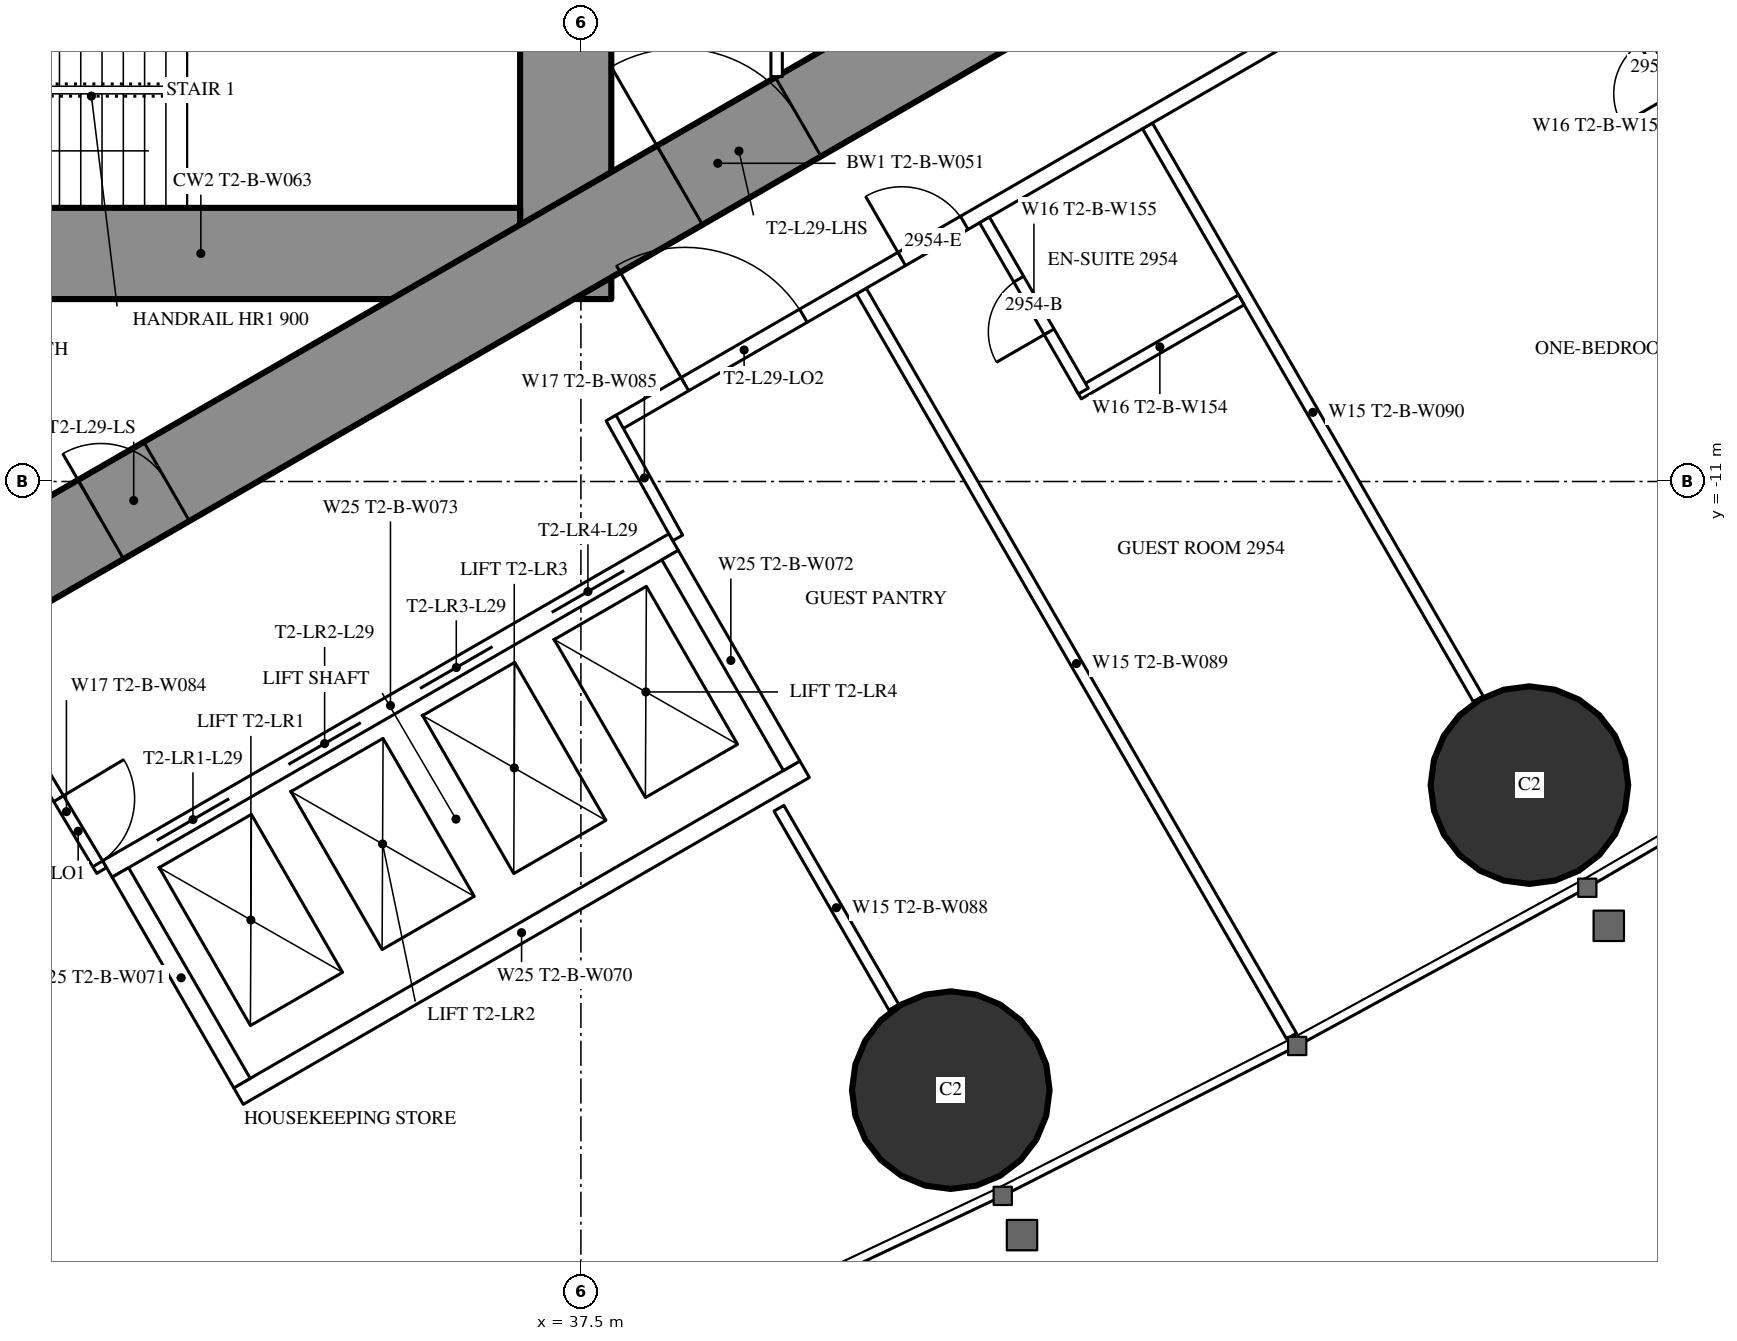
"""IFC4 building model, lengths in metres.
Left out: names, types, materials, properties, quantities, classifications, styles, units other than length and angle.
Written with IfcOpenShell. Run it as: python <this file> out.ifc"""

import sys

from ifc_helpers import new_model, si_unit, direction, frame, frame_2d, origin, origin_2d, place, context, subcontext, project, spatial, rectangle, hollow_circle, extrude, element, fill, save


model = new_model("IFC4")
c1 = context("Model", 3, precision=1e-05, world=origin(), true_north=direction((0.0, 1.0)))
c2 = subcontext(c1, "Body", "Model", "MODEL_VIEW")
j1 = project(units=[si_unit("LENGTHUNIT", "METRE"), si_unit("PLANEANGLEUNIT", "RADIAN")], contexts=[c1])
p1 = place(None, origin())
s1 = spatial("IfcSite", under=j1, at=p1, CompositionType="ELEMENT")
p2 = place(p1, origin())
s2 = spatial("IfcBuilding", under=s1, at=p2, CompositionType="ELEMENT")
p3 = place(p2, frame((0.0, 0.0, 111.6)))
s3 = spatial("IfcBuildingStorey", under=s2, at=p3, CompositionType="ELEMENT", Elevation=111.6)
for number, where, z_axis, x_axis in (
    (1, (42.366, -19.007, 0.0), (0.0, 0.0, 1.0), (1.0, 0.0, 0.0)),
    (2, (49.979, -14.994, 0.0), (0.0, 0.0, 1.0), (1.0, 0.0, 0.0)),
):
    element("IfcColumn", number, at=place(p3, frame(where, z_axis=z_axis, x_axis=x_axis)), inside=s3, PredefinedType="COLUMN", context=c2, shape_type="SweptSolid", body=[
        extrude(hollow_circle(Radius=1.3, WallThickness=0.1, at=origin_2d()), origin(), (0.0, 0.0, 1.0), 3.5),
    ])
p4 = place(p3, frame((37.3, -8.6, 0.0), z_axis=(0.0, 0.0, 1.0), x_axis=(0.0, 1.0, 0.0)))
e3 = element("IfcWall", 3, at=p4, inside=s3, PredefinedType="SHEAR", context=c2, shape_type="SweptSolid", body=[
    extrude(rectangle(XDim=17.2, YDim=1.2, at=frame_2d((8.6, 0.0))), origin(), (0.0, 0.0, 1.0), 3.5),
])
p5 = place(p4, frame((7.7, 0.0, 0.0)))
e4 = element("IfcOpeningElement", 4, at=p5, cuts=e3, PredefinedType="OPENING", context=c2, shape_type="SweptSolid", body=[
    extrude(rectangle(XDim=1.8, YDim=2.2, at=frame_2d((0.9, 1.1))), frame((0.0, 0.61, 0.0), z_axis=(0.0, -1.0, 0.0), x_axis=(1.0, 0.0, 0.0)), (0.0, 0.0, 1.0), 1.22),
])
p6 = place(p3, frame((28.3, -8.0, 0.0), z_axis=(0.0, 0.0, 1.0), x_axis=(1.0, 0.0, 0.0)))
e5 = element("IfcWall", 5, at=p6, inside=s3, PredefinedType="SHEAR", context=c2, shape_type="SweptSolid", body=[
    extrude(rectangle(XDim=8.4, YDim=1.2, at=frame_2d((4.2, 0.0))), origin(), (0.0, 0.0, 1.0), 3.5),
])
p7 = place(p6, frame((0.25, 0.0, 0.0)))
e6 = element("IfcOpeningElement", 6, at=p7, cuts=e5, PredefinedType="OPENING", context=c2, shape_type="SweptSolid", body=[
    extrude(rectangle(XDim=1.0, YDim=2.2, at=frame_2d((0.5, 1.1))), frame((0.0, 0.61, 0.0), z_axis=(0.0, -1.0, 0.0), x_axis=(1.0, 0.0, 0.0)), (0.0, 0.0, 1.0), 1.22),
])
p8 = place(p3, frame((27.2, -13.8, 0.0), z_axis=(0.0, 0.0, 1.0), x_axis=(0.866027159892, 0.499996958321, 0.0)))
e7 = element("IfcWall", 7, at=p8, inside=s3, PredefinedType="SHEAR", context=c2, shape_type="SweptSolid", body=[
    extrude(rectangle(XDim=27.947, YDim=1.2, at=frame_2d((13.973, 0.0))), origin(), (0.0, 0.0, 1.0), 3.5),
])
p9 = place(p8, frame((4.6, 0.0, 0.0)))
e8 = element("IfcOpeningElement", 8, at=p9, cuts=e7, PredefinedType="OPENING", context=c2, shape_type="SweptSolid", body=[
    extrude(rectangle(XDim=1.0, YDim=2.2, at=frame_2d((0.5, 1.1))), frame((0.0, 0.61, 0.0), z_axis=(0.0, -1.0, 0.0), x_axis=(1.0, 0.0, 0.0)), (0.0, 0.0, 1.0), 1.22),
])
p10 = place(p8, frame((13.395, 0.0, 0.0)))
e9 = element("IfcOpeningElement", 9, at=p10, cuts=e7, PredefinedType="OPENING", context=c2, shape_type="SweptSolid", body=[
    extrude(rectangle(XDim=1.8, YDim=2.2, at=frame_2d((0.9, 1.1))), frame((0.0, 0.61, 0.0), z_axis=(0.0, -1.0, 0.0), x_axis=(1.0, 0.0, 0.0)), (0.0, 0.0, 1.0), 1.22),
])
p11 = place(p3, frame((41.19, -8.494, 0.0), z_axis=(0.0, 0.0, 1.0), x_axis=(0.49999258054, -0.866029687369, 0.0)))
e10 = element("IfcWall", 10, at=p11, inside=s3, PredefinedType="PARTITIONING", context=c2, shape_type="SweptSolid", body=[
    extrude(rectangle(XDim=11.318, YDim=0.15, at=frame_2d((5.659, 0.0))), origin(), (0.0, 0.0, 1.0), 3.25),
])
p12 = place(p3, frame((44.954, -6.321, 0.0), z_axis=(0.0, 0.0, 1.0), x_axis=(0.500018676722, -0.866014620505, 0.0)))
e11 = element("IfcWall", 11, at=p12, inside=s3, PredefinedType="PARTITIONING", context=c2, shape_type="SweptSolid", body=[
    extrude(rectangle(XDim=8.704, YDim=0.15, at=frame_2d((4.352, 0.0))), origin(), (0.0, 0.0, 1.0), 2.2),
])
p13 = place(p3, frame((40.105, -15.299, 0.0), z_axis=(0.0, 0.0, 1.0), x_axis=(0.499978822259, -0.866037630414, 0.0)))
e12 = element("IfcWall", 12, at=p13, inside=s3, PredefinedType="PARTITIONING", context=c2, shape_type="SweptSolid", body=[
    extrude(rectangle(XDim=3.023, YDim=0.15, at=frame_2d((1.511, 0.0))), origin(), (0.0, 0.0, 1.0), 3.25),
])
p14 = place(p3, frame((37.96, -10.243, 0.0), z_axis=(0.0, 0.0, 1.0), x_axis=(0.866026429433, 0.499998223521, 0.0)))
e13 = element("IfcWall", 13, at=p14, inside=s3, PredefinedType="PARTITIONING", context=c2, shape_type="SweptSolid", body=[
    extrude(rectangle(XDim=20.487, YDim=0.2, at=frame_2d((10.243, 0.0))), origin(), (0.0, 0.0, 1.0), 3.25),
])
p15 = place(p14, frame((4.343, 0.0, 0.0)))
e14 = element("IfcOpeningElement", 14, at=p15, cuts=e13, PredefinedType="OPENING", context=c2, shape_type="SweptSolid", body=[
    extrude(rectangle(XDim=0.95, YDim=2.2, at=frame_2d((0.475, 1.1))), frame((0.0, 0.11, 0.0), z_axis=(0.0, -1.0, 0.0), x_axis=(1.0, 0.0, 0.0)), (0.0, 0.0, 1.0), 0.22),
])
p16 = place(p14, frame((15.385, 0.0, 0.0)))
e15 = element("IfcOpeningElement", 15, at=p16, cuts=e13, PredefinedType="OPENING", context=c2, shape_type="SweptSolid", body=[
    extrude(rectangle(XDim=0.95, YDim=2.2, at=frame_2d((0.475, 1.1))), frame((0.0, 0.11, 0.0), z_axis=(0.0, -1.0, 0.0), x_axis=(1.0, 0.0, 0.0)), (0.0, 0.0, 1.0), 0.22),
])
p17 = place(p14, frame((17.085, 0.0, 0.0)))
e16 = element("IfcOpeningElement", 16, at=p17, cuts=e13, PredefinedType="OPENING", context=c2, shape_type="SweptSolid", body=[
    extrude(rectangle(XDim=0.95, YDim=2.2, at=frame_2d((0.475, 1.1))), frame((0.0, 0.11, 0.0), z_axis=(0.0, -1.0, 0.0), x_axis=(1.0, 0.0, 0.0)), (0.0, 0.0, 1.0), 0.22),
])
p18 = place(p14, frame((1.048, 0.0, 0.0)))
e17 = element("IfcOpeningElement", 17, at=p18, cuts=e13, PredefinedType="OPENING", context=c2, shape_type="SweptSolid", body=[
    extrude(rectangle(XDim=1.8, YDim=2.2, at=frame_2d((0.9, 1.1))), frame((0.0, 0.11, 0.0), z_axis=(0.0, -1.0, 0.0), x_axis=(1.0, 0.0, 0.0)), (0.0, 0.0, 1.0), 0.22),
])
p19 = place(p3, frame((30.267, -14.569, 0.0), z_axis=(0.0, 0.0, 1.0), x_axis=(0.514336634837, -0.857588377991, 0.0)))
e18 = element("IfcWall", 18, at=p19, inside=s3, PredefinedType="PARTITIONING", context=c2, shape_type="SweptSolid", body=[
    extrude(rectangle(XDim=1.805, YDim=0.15, at=frame_2d((0.903, 0.0))), origin(), (0.0, 0.0, 1.0), 3.25),
])
p20 = place(p19, frame((0.703, 0.0, 0.0)))
e19 = element("IfcOpeningElement", 19, at=p20, cuts=e18, PredefinedType="OPENING", context=c2, shape_type="SweptSolid", body=[
    extrude(rectangle(XDim=1.0, YDim=2.2, at=frame_2d((0.5, 1.1))), frame((0.0, 0.085, 0.0), z_axis=(0.0, -1.0, 0.0), x_axis=(1.0, 0.0, 0.0)), (0.0, 0.0, 1.0), 0.17),
])
p21 = place(p3, frame((38.773, -11.742, 0.0), z_axis=(0.0, 0.0, 1.0), x_axis=(-0.485528096672, 0.8742210632, 0.0)))
e20 = element("IfcWall", 20, at=p21, inside=s3, PredefinedType="PARTITIONING", context=c2, shape_type="SweptSolid", body=[
    extrude(rectangle(XDim=1.805, YDim=0.15, at=frame_2d((0.903, 0.0))), origin(), (0.0, 0.0, 1.0), 3.25),
])
p22 = place(p3, frame((44.045, -9.848, 0.0), z_axis=(0.0, 0.0, 1.0), x_axis=(0.866031185235, 0.4999899861, 0.0)))
e21 = element("IfcWall", 21, at=p22, inside=s3, PredefinedType="PARTITIONING", context=c2, shape_type="SweptSolid", body=[
    extrude(rectangle(XDim=2.475, YDim=0.15, at=frame_2d((1.238, 0.0))), origin(), (0.0, 0.0, 1.0), 3.25),
])
p23 = place(p3, frame((42.81, -7.559, 0.0), z_axis=(0.0, 0.0, 1.0), x_axis=(0.499936506574, -0.866062058628, 0.0)))
e22 = element("IfcWall", 22, at=p23, inside=s3, PredefinedType="PARTITIONING", context=c2, shape_type="SweptSolid", body=[
    extrude(rectangle(XDim=2.6, YDim=0.15, at=frame_2d((1.3, 0.0))), origin(), (0.0, 0.0, 1.0), 3.25),
])
p24 = place(p23, frame((0.9, 0.0, 0.0)))
e23 = element("IfcOpeningElement", 23, at=p24, cuts=e22, PredefinedType="OPENING", context=c2, shape_type="SweptSolid", body=[
    extrude(rectangle(XDim=0.8, YDim=2.2, at=frame_2d((0.4, 1.1))), frame((0.0, 0.085, 0.0), z_axis=(0.0, -1.0, 0.0), x_axis=(1.0, 0.0, 0.0)), (0.0, 0.0, 1.0), 0.17),
])
p25 = place(p3, frame((51.038, -4.425, 0.0), z_axis=(0.0, 0.0, 1.0), x_axis=(0.49997716683, -0.86603858612, 0.0)))
e24 = element("IfcWall", 24, at=p25, inside=s3, PredefinedType="PARTITIONING", context=c2, shape_type="SweptSolid", body=[
    extrude(rectangle(XDim=2.6, YDim=0.15, at=frame_2d((1.3, 0.0))), origin(), (0.0, 0.0, 1.0), 3.25),
])
p26 = place(p25, frame((0.9, 0.0, 0.0)))
e25 = element("IfcOpeningElement", 25, at=p26, cuts=e24, PredefinedType="OPENING", context=c2, shape_type="SweptSolid", body=[
    extrude(rectangle(XDim=0.8, YDim=2.2, at=frame_2d((0.4, 1.1))), frame((0.0, 0.085, 0.0), z_axis=(0.0, -1.0, 0.0), x_axis=(1.0, 0.0, 0.0)), (0.0, 0.0, 1.0), 0.17),
])
p27 = place(p3, frame((40.075, -5.674, 0.0), z_axis=(0.0, 0.0, 1.0), x_axis=(0.0, 1.0, 0.0)))
e26 = element("IfcWall", 26, at=p27, inside=s3, PredefinedType="PARTITIONING", context=c2, shape_type="SweptSolid", body=[
    extrude(rectangle(XDim=6.874, YDim=0.15, at=frame_2d((3.437, 0.0))), origin(), (0.0, 0.0, 1.0), 3.25),
])
p28 = place(p27, frame((2.537, 0.0, 0.0)))
e27 = element("IfcOpeningElement", 27, at=p28, cuts=e26, PredefinedType="OPENING", context=c2, shape_type="SweptSolid", body=[
    extrude(rectangle(XDim=1.8, YDim=2.2, at=frame_2d((0.9, 1.1))), frame((0.0, 0.085, 0.0), z_axis=(0.0, -1.0, 0.0), x_axis=(1.0, 0.0, 0.0)), (0.0, 0.0, 1.0), 0.17),
])
p29 = place(p3, frame((31.271, -16.097, 0.0), z_axis=(0.0, 0.0, 1.0), x_axis=(0.86604045752, 0.499973925258, 0.0)))
e28 = element("IfcWall", 28, at=p29, inside=s3, PredefinedType="PARTITIONING", context=c2, shape_type="SweptSolid", body=[
    extrude(rectangle(XDim=8.6, YDim=0.25, at=frame_2d((4.3, 0.0))), origin(), (0.0, 0.0, 1.0), 3.25),
])
p30 = place(p29, frame((0.75, 0.0, 0.0)))
e29 = element("IfcOpeningElement", 29, at=p30, cuts=e28, PredefinedType="OPENING", context=c2, shape_type="SweptSolid", body=[
    extrude(rectangle(XDim=1.1, YDim=2.2, at=frame_2d((0.55, 1.1))), frame((0.0, 0.135, 0.0), z_axis=(0.0, -1.0, 0.0), x_axis=(1.0, 0.0, 0.0)), (0.0, 0.0, 1.0), 0.27),
])
p31 = place(p29, frame((2.75, 0.0, 0.0)))
e30 = element("IfcOpeningElement", 30, at=p31, cuts=e28, PredefinedType="OPENING", context=c2, shape_type="SweptSolid", body=[
    extrude(rectangle(XDim=1.1, YDim=2.2, at=frame_2d((0.55, 1.1))), frame((0.0, 0.135, 0.0), z_axis=(0.0, -1.0, 0.0), x_axis=(1.0, 0.0, 0.0)), (0.0, 0.0, 1.0), 0.27),
])
p32 = place(p29, frame((4.75, 0.0, 0.0)))
e31 = element("IfcOpeningElement", 31, at=p32, cuts=e28, PredefinedType="OPENING", context=c2, shape_type="SweptSolid", body=[
    extrude(rectangle(XDim=1.1, YDim=2.2, at=frame_2d((0.55, 1.1))), frame((0.0, 0.135, 0.0), z_axis=(0.0, -1.0, 0.0), x_axis=(1.0, 0.0, 0.0)), (0.0, 0.0, 1.0), 0.27),
])
p33 = place(p29, frame((6.75, 0.0, 0.0)))
e32 = element("IfcOpeningElement", 32, at=p33, cuts=e28, PredefinedType="OPENING", context=c2, shape_type="SweptSolid", body=[
    extrude(rectangle(XDim=1.1, YDim=2.2, at=frame_2d((0.55, 1.1))), frame((0.0, 0.135, 0.0), z_axis=(0.0, -1.0, 0.0), x_axis=(1.0, 0.0, 0.0)), (0.0, 0.0, 1.0), 0.27),
])
p34 = place(p3, frame((32.996, -19.086, 0.0), z_axis=(0.0, 0.0, 1.0), x_axis=(0.866028165386, 0.499995216735, 0.0)))
e33 = element("IfcWall", 33, at=p34, inside=s3, PredefinedType="PARTITIONING", context=c2, shape_type="SweptSolid", body=[
    extrude(rectangle(XDim=8.6, YDim=0.25, at=frame_2d((4.3, 0.0))), origin(), (0.0, 0.0, 1.0), 3.25),
])
for number, where, z_axis, x_axis in (
    (34, (31.441, -16.143, 0.0), (0.0, 0.0, 1.0), (0.5, -0.866, 0.0)),
    (35, (38.673, -11.968, 0.0), (0.0, 0.0, 1.0), (0.5, -0.866, 0.0)),
):
    element("IfcWall", number, at=place(p3, frame(where, z_axis=z_axis, x_axis=x_axis)), inside=s3, PredefinedType="PARTITIONING", context=c2, shape_type="SweptSolid", body=[
        extrude(rectangle(XDim=3.201, YDim=0.25, at=frame_2d((1.6, 0.0))), origin(), (0.0, 0.0, 1.0), 3.25),
    ])
p35 = place(p24, origin())
e36 = element("IfcDoor", 36, at=p35, inside=s3, OperationType="SINGLE_SWING_RIGHT", PredefinedType="DOOR", context=c2, shape_type="SweptSolid", body=[
    extrude(rectangle(XDim=0.8, YDim=2.2, at=frame_2d((0.4, 1.1))), frame((0.0, 0.025, 0.0), z_axis=(0.0, -1.0, 0.0), x_axis=(1.0, 0.0, 0.0)), (0.0, 0.0, 1.0), 0.05),
])
fill(e23, e36)
p36 = place(p15, origin())
e37 = element("IfcDoor", 37, at=p36, inside=s3, OperationType="SINGLE_SWING_LEFT", PredefinedType="DOOR", context=c2, shape_type="SweptSolid", body=[
    extrude(rectangle(XDim=0.95, YDim=2.2, at=frame_2d((0.475, 1.1))), frame((0.0, 0.025, 0.0), z_axis=(0.0, -1.0, 0.0), x_axis=(1.0, 0.0, 0.0)), (0.0, 0.0, 1.0), 0.05),
])
fill(e14, e37)
p37 = place(p26, origin())
e38 = element("IfcDoor", 38, at=p37, inside=s3, OperationType="SINGLE_SWING_RIGHT", PredefinedType="DOOR", context=c2, shape_type="SweptSolid", body=[
    extrude(rectangle(XDim=0.8, YDim=2.2, at=frame_2d((0.4, 1.1))), frame((0.0, 0.025, 0.0), z_axis=(0.0, -1.0, 0.0), x_axis=(1.0, 0.0, 0.0)), (0.0, 0.0, 1.0), 0.05),
])
fill(e25, e38)
p38 = place(p20, origin())
e39 = element("IfcDoor", 39, at=p38, inside=s3, OperationType="SINGLE_SWING_LEFT", PredefinedType="DOOR", context=c2, shape_type="SweptSolid", body=[
    extrude(rectangle(XDim=1.0, YDim=2.2, at=frame_2d((0.5, 1.1))), frame((0.0, 0.025, 0.0), z_axis=(0.0, -1.0, 0.0), x_axis=(1.0, 0.0, 0.0)), (0.0, 0.0, 1.0), 0.05),
])
fill(e19, e39)
p39 = place(p18, origin())
e40 = element("IfcDoor", 40, at=p39, inside=s3, OperationType="DOUBLE_DOOR_SINGLE_SWING", PredefinedType="DOOR", context=c2, shape_type="SweptSolid", body=[
    extrude(rectangle(XDim=1.8, YDim=2.2, at=frame_2d((0.9, 1.1))), frame((0.0, 0.025, 0.0), z_axis=(0.0, -1.0, 0.0), x_axis=(1.0, 0.0, 0.0)), (0.0, 0.0, 1.0), 0.05),
])
fill(e17, e40)
p40 = place(p9, origin())
e41 = element("IfcDoor", 41, at=p40, inside=s3, OperationType="SINGLE_SWING_LEFT", PredefinedType="DOOR", context=c2, shape_type="SweptSolid", body=[
    extrude(rectangle(XDim=1.0, YDim=2.2, at=frame_2d((0.5, 1.1))), frame((0.0, 0.025, 0.0), z_axis=(0.0, -1.0, 0.0), x_axis=(1.0, 0.0, 0.0)), (0.0, 0.0, 1.0), 0.05),
])
fill(e8, e41)
p41 = place(p10, origin())
e42 = element("IfcDoor", 42, at=p41, inside=s3, OperationType="DOUBLE_DOOR_SINGLE_SWING", PredefinedType="DOOR", context=c2, shape_type="SweptSolid", body=[
    extrude(rectangle(XDim=1.8, YDim=2.2, at=frame_2d((0.9, 1.1))), frame((0.0, 0.025, 0.0), z_axis=(0.0, -1.0, 0.0), x_axis=(1.0, 0.0, 0.0)), (0.0, 0.0, 1.0), 0.05),
])
fill(e9, e42)
p42 = place(p30, origin())
e43 = element("IfcDoor", 43, at=p42, inside=s3, OperationType="DOUBLE_DOOR_SLIDING", PredefinedType="USERDEFINED", context=c2, shape_type="SweptSolid", body=[
    extrude(rectangle(XDim=1.1, YDim=2.2, at=frame_2d((0.55, 1.1))), frame((0.0, 0.025, 0.0), z_axis=(0.0, -1.0, 0.0), x_axis=(1.0, 0.0, 0.0)), (0.0, 0.0, 1.0), 0.05),
])
fill(e29, e43)
p43 = place(p31, origin())
e44 = element("IfcDoor", 44, at=p43, inside=s3, OperationType="DOUBLE_DOOR_SLIDING", PredefinedType="USERDEFINED", context=c2, shape_type="SweptSolid", body=[
    extrude(rectangle(XDim=1.1, YDim=2.2, at=frame_2d((0.55, 1.1))), frame((0.0, 0.025, 0.0), z_axis=(0.0, -1.0, 0.0), x_axis=(1.0, 0.0, 0.0)), (0.0, 0.0, 1.0), 0.05),
])
fill(e30, e44)
p44 = place(p32, origin())
e45 = element("IfcDoor", 45, at=p44, inside=s3, OperationType="DOUBLE_DOOR_SLIDING", PredefinedType="USERDEFINED", context=c2, shape_type="SweptSolid", body=[
    extrude(rectangle(XDim=1.1, YDim=2.2, at=frame_2d((0.55, 1.1))), frame((0.0, 0.025, 0.0), z_axis=(0.0, -1.0, 0.0), x_axis=(1.0, 0.0, 0.0)), (0.0, 0.0, 1.0), 0.05),
])
fill(e31, e45)
p45 = place(p33, origin())
e46 = element("IfcDoor", 46, at=p45, inside=s3, OperationType="DOUBLE_DOOR_SLIDING", PredefinedType="USERDEFINED", context=c2, shape_type="SweptSolid", body=[
    extrude(rectangle(XDim=1.1, YDim=2.2, at=frame_2d((0.55, 1.1))), frame((0.0, 0.025, 0.0), z_axis=(0.0, -1.0, 0.0), x_axis=(1.0, 0.0, 0.0)), (0.0, 0.0, 1.0), 0.05),
])
fill(e32, e46)
save(model, sys.argv[1])
